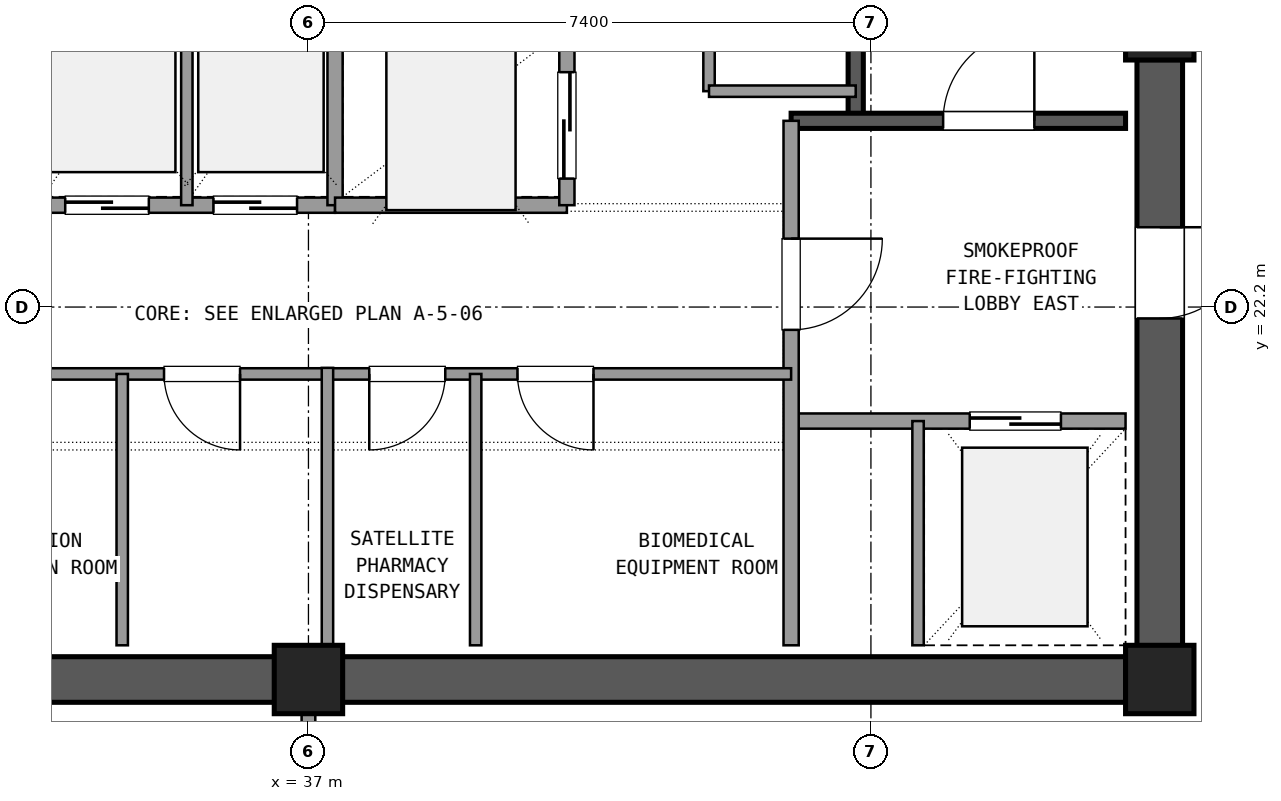
"""IFC4 building model, lengths in metres.
Left out: names, types, materials, properties, quantities, classifications, styles, units other than length and angle.
Written with IfcOpenShell. Run it as: python <this file> out.ifc"""

import sys

from ifc_helpers import new_model, si_unit, direction, frame, frame_2d, origin, origin_2d, place, context, subcontext, project, spatial, rectangle, extrude, element, fill, save


model = new_model("IFC4")
c1 = context("Model", 3, precision=1e-05, world=origin(), true_north=direction((0.0, 1.0)))
c2 = subcontext(c1, "Body", "Model", "MODEL_VIEW")
j1 = project(units=[si_unit("LENGTHUNIT", "METRE"), si_unit("PLANEANGLEUNIT", "RADIAN")], contexts=[c1])
p1 = place(None, origin())
s1 = spatial("IfcSite", under=j1, at=p1, CompositionType="ELEMENT")
p2 = place(p1, origin())
s2 = spatial("IfcBuilding", under=s1, at=p2, CompositionType="ELEMENT")
p3 = place(p2, frame((0.0, 0.0, 242.82)))
s3 = spatial("IfcBuildingStorey", under=s2, at=p3, CompositionType="ELEMENT", Elevation=242.82)
for number, where, z_axis, x_axis in (
    (1, (37.0, 17.3, 0.0), (0.0, 0.0, 1.0), (1.0, 0.0, 0.0)),
    (2, (48.2, 17.3, 0.0), (0.0, 0.0, 1.0), (1.0, 0.0, 0.0)),
    (3, (48.2, 25.9, 0.0), (0.0, 0.0, 1.0), (1.0, 0.0, 0.0)),
):
    element("IfcColumn", number, at=place(p3, frame(where, z_axis=z_axis, x_axis=x_axis)), inside=s3, PredefinedType="COLUMN", context=c2, shape_type="SweptSolid", body=[
        extrude(rectangle(XDim=0.9, YDim=0.9, at=origin_2d()), origin(), (0.0, 0.0, 1.0), 3.6),
    ])
for number, where, z_axis, x_axis in (
    (4, (26.245, 17.3, 0.0), (0.0, 0.0, 1.0), (1.0, 0.0, 0.0)),
    (5, (37.445, 17.3, 0.0), (0.0, 0.0, 1.0), (1.0, 0.0, 0.0)),
):
    element("IfcWall", number, at=place(p3, frame(where, z_axis=z_axis, x_axis=x_axis)), inside=s3, PredefinedType="SHEAR", context=c2, shape_type="SweptSolid", body=[
        extrude(rectangle(XDim=10.31, YDim=0.6, at=frame_2d((5.155, 0.0))), origin(), (0.0, 0.0, 1.0), 3.32),
    ])
p4 = place(p3, frame((48.2, 17.745, 0.0), z_axis=(0.0, 0.0, 1.0), x_axis=(0.0, 1.0, 0.0)))
e6 = element("IfcWall", 6, at=p4, inside=s3, PredefinedType="SHEAR", context=c2, shape_type="SweptSolid", body=[
    extrude(rectangle(XDim=7.71, YDim=0.6, at=frame_2d((3.855, 0.0))), origin(), (0.0, 0.0, 1.0), 3.32),
])
p5 = place(p4, frame((4.305, 0.0, 0.0)))
e7 = element("IfcOpeningElement", 7, at=p5, cuts=e6, PredefinedType="OPENING", context=c2, shape_type="SweptSolid", body=[
    extrude(rectangle(XDim=1.2, YDim=2.15, at=frame_2d((0.6, 1.075))), frame((0.0, 0.31, 0.0), z_axis=(0.0, -1.0, 0.0), x_axis=(1.0, 0.0, 0.0)), (0.0, 0.0, 1.0), 0.62),
])
p6 = place(p3, frame((44.2, 24.65, 0.0), z_axis=(0.0, 0.0, 1.0), x_axis=(0.0, 1.0, 0.0)))
e8 = element("IfcWall", 8, at=p6, inside=s3, PredefinedType="SHEAR", context=c2, shape_type="SweptSolid", body=[
    extrude(rectangle(XDim=9.4, YDim=0.2, at=frame_2d((4.7, 0.0))), origin(), (0.0, 0.0, 1.0), 3.32),
])
p7 = place(p3, frame((43.35, 24.65, 0.0), z_axis=(0.0, 0.0, 1.0), x_axis=(1.0, 0.0, 0.0)))
e9 = element("IfcWall", 9, at=p7, inside=s3, PredefinedType="SHEAR", context=c2, shape_type="SweptSolid", body=[
    extrude(rectangle(XDim=4.4, YDim=0.2, at=frame_2d((2.2, 0.0))), origin(), (0.0, 0.0, 1.0), 3.32),
])
p8 = place(p7, frame((2.0, 0.0, 0.0)))
e10 = element("IfcOpeningElement", 10, at=p8, cuts=e9, PredefinedType="OPENING", context=c2, shape_type="SweptSolid", body=[
    extrude(rectangle(XDim=1.2, YDim=2.15, at=frame_2d((0.6, 1.075))), frame((0.0, 0.11, 0.0), z_axis=(0.0, -1.0, 0.0), x_axis=(1.0, 0.0, 0.0)), (0.0, 0.0, 1.0), 0.22),
])
p9 = place(p3, frame((43.35, 20.7, 0.0), z_axis=(0.0, 0.0, 1.0), x_axis=(1.0, 0.0, 0.0)))
e11 = element("IfcWall", 11, at=p9, inside=s3, PredefinedType="SOLIDWALL", context=c2, shape_type="SweptSolid", body=[
    extrude(rectangle(XDim=4.4, YDim=0.2, at=frame_2d((2.2, 0.0))), origin(), (0.0, 0.0, 1.0), 2.61),
])
p10 = place(p9, frame((2.35, 0.0, 0.0)))
e12 = element("IfcOpeningElement", 12, at=p10, cuts=e11, PredefinedType="OPENING", context=c2, shape_type="SweptSolid", body=[
    extrude(rectangle(XDim=1.2, YDim=2.15, at=frame_2d((0.6, 1.075))), frame((0.0, 0.11, 0.0), z_axis=(0.0, -1.0, 0.0), x_axis=(1.0, 0.0, 0.0)), (0.0, 0.0, 1.0), 0.22),
])
p11 = place(p3, frame((43.35, 17.75, 0.0), z_axis=(0.0, 0.0, 1.0), x_axis=(0.0, 1.0, 0.0)))
e13 = element("IfcWall", 13, at=p11, inside=s3, PredefinedType="SOLIDWALL", context=c2, shape_type="SweptSolid", body=[
    extrude(rectangle(XDim=6.9, YDim=0.2, at=frame_2d((3.45, 0.0))), origin(), (0.0, 0.0, 1.0), 2.61),
])
p12 = place(p11, frame((4.15, 0.0, 0.0)))
e14 = element("IfcOpeningElement", 14, at=p12, cuts=e13, PredefinedType="OPENING", context=c2, shape_type="SweptSolid", body=[
    extrude(rectangle(XDim=1.2, YDim=2.15, at=frame_2d((0.6, 1.075))), frame((0.0, 0.11, 0.0), z_axis=(0.0, -1.0, 0.0), x_axis=(1.0, 0.0, 0.0)), (0.0, 0.0, 1.0), 0.22),
])
p13 = place(p3, frame((45.02, 17.75, 0.0), z_axis=(0.0, 0.0, 1.0), x_axis=(0.0, 1.0, 0.0)))
e15 = element("IfcWall", 15, at=p13, inside=s3, PredefinedType="PARTITIONING", context=c2, shape_type="SweptSolid", body=[
    extrude(rectangle(XDim=2.95, YDim=0.15, at=frame_2d((1.475, 0.0))), origin(), (0.0, 0.0, 1.0), 2.61),
])
p14 = place(p3, frame((30.25, 21.32, 0.0), z_axis=(0.0, 0.0, 1.0), x_axis=(1.0, 0.0, 0.0)))
e16 = element("IfcWall", 16, at=p14, inside=s3, PredefinedType="PARTITIONING", context=c2, shape_type="SweptSolid", body=[
    extrude(rectangle(XDim=7.0, YDim=0.15, at=frame_2d((3.5, 0.0))), origin(), (0.0, 0.0, 1.0), 2.61),
])
p15 = place(p14, frame((0.7, 0.0, 0.0)))
e17 = element("IfcOpeningElement", 17, at=p15, cuts=e16, PredefinedType="OPENING", context=c2, shape_type="SweptSolid", body=[
    extrude(rectangle(XDim=1.0, YDim=2.15, at=frame_2d((0.5, 1.075))), frame((0.0, 0.085, 0.0), z_axis=(0.0, -1.0, 0.0), x_axis=(1.0, 0.0, 0.0)), (0.0, 0.0, 1.0), 0.17),
])
p16 = place(p14, frame((4.85, 0.0, 0.0)))
e18 = element("IfcOpeningElement", 18, at=p16, cuts=e16, PredefinedType="OPENING", context=c2, shape_type="SweptSolid", body=[
    extrude(rectangle(XDim=1.0, YDim=2.15, at=frame_2d((0.5, 1.075))), frame((0.0, 0.085, 0.0), z_axis=(0.0, -1.0, 0.0), x_axis=(1.0, 0.0, 0.0)), (0.0, 0.0, 1.0), 0.17),
])
p17 = place(p3, frame((34.55, 17.75, 0.0), z_axis=(0.0, 0.0, 1.0), x_axis=(0.0, 1.0, 0.0)))
e19 = element("IfcWall", 19, at=p17, inside=s3, PredefinedType="PARTITIONING", context=c2, shape_type="SweptSolid", body=[
    extrude(rectangle(XDim=3.57, YDim=0.15, at=frame_2d((1.785, 0.0))), origin(), (0.0, 0.0, 1.0), 2.61),
])
p18 = place(p3, frame((37.25, 21.32, 0.0), z_axis=(0.0, 0.0, 1.0), x_axis=(1.0, 0.0, 0.0)))
e20 = element("IfcWall", 20, at=p18, inside=s3, PredefinedType="PARTITIONING", context=c2, shape_type="SweptSolid", body=[
    extrude(rectangle(XDim=6.1, YDim=0.15, at=frame_2d((3.05, 0.0))), origin(), (0.0, 0.0, 1.0), 2.61),
])
p19 = place(p18, frame((0.55, 0.0, 0.0)))
e21 = element("IfcOpeningElement", 21, at=p19, cuts=e20, PredefinedType="OPENING", context=c2, shape_type="SweptSolid", body=[
    extrude(rectangle(XDim=1.0, YDim=2.15, at=frame_2d((0.5, 1.075))), frame((0.0, 0.085, 0.0), z_axis=(0.0, -1.0, 0.0), x_axis=(1.0, 0.0, 0.0)), (0.0, 0.0, 1.0), 0.17),
])
p20 = place(p18, frame((2.5, 0.0, 0.0)))
e22 = element("IfcOpeningElement", 22, at=p20, cuts=e20, PredefinedType="OPENING", context=c2, shape_type="SweptSolid", body=[
    extrude(rectangle(XDim=1.0, YDim=2.15, at=frame_2d((0.5, 1.075))), frame((0.0, 0.085, 0.0), z_axis=(0.0, -1.0, 0.0), x_axis=(1.0, 0.0, 0.0)), (0.0, 0.0, 1.0), 0.17),
])
p21 = place(p3, frame((39.2, 17.75, 0.0), z_axis=(0.0, 0.0, 1.0), x_axis=(0.0, 1.0, 0.0)))
e23 = element("IfcWall", 23, at=p21, inside=s3, PredefinedType="PARTITIONING", context=c2, shape_type="SweptSolid", body=[
    extrude(rectangle(XDim=3.57, YDim=0.15, at=frame_2d((1.785, 0.0))), origin(), (0.0, 0.0, 1.0), 2.61),
])
p22 = place(p3, frame((37.25, 17.75, 0.0), z_axis=(0.0, 0.0, 1.0), x_axis=(0.0, 1.0, 0.0)))
e24 = element("IfcWall", 24, at=p22, inside=s3, PredefinedType="PARTITIONING", context=c2, shape_type="SweptSolid", body=[
    extrude(rectangle(XDim=3.65, YDim=0.15, at=frame_2d((1.825, 0.0))), origin(), (0.0, 0.0, 1.0), 2.61),
])
p23 = place(p3, frame((31.45, 23.54, 0.0), z_axis=(0.0, 0.0, 1.0), x_axis=(1.0, 0.0, 0.0)))
e25 = element("IfcWall", 25, at=p23, inside=s3, PredefinedType="SOLIDWALL", context=c2, shape_type="SweptSolid", body=[
    extrude(rectangle(XDim=5.9, YDim=0.2, at=frame_2d((2.95, 0.0))), origin(), (0.0, 0.0, 1.0), 2.61),
])
p24 = place(p23, frame((0.4, 0.0, 0.0)))
e26 = element("IfcOpeningElement", 26, at=p24, cuts=e25, PredefinedType="OPENING", context=c2, shape_type="SweptSolid", body=[
    extrude(rectangle(XDim=1.1, YDim=2.15, at=frame_2d((0.55, 1.075))), frame((0.0, 0.11, 0.0), z_axis=(0.0, -1.0, 0.0), x_axis=(1.0, 0.0, 0.0)), (0.0, 0.0, 1.0), 0.22),
])
p25 = place(p23, frame((2.35, 0.0, 0.0)))
e27 = element("IfcOpeningElement", 27, at=p25, cuts=e25, PredefinedType="OPENING", context=c2, shape_type="SweptSolid", body=[
    extrude(rectangle(XDim=1.1, YDim=2.15, at=frame_2d((0.55, 1.075))), frame((0.0, 0.11, 0.0), z_axis=(0.0, -1.0, 0.0), x_axis=(1.0, 0.0, 0.0)), (0.0, 0.0, 1.0), 0.22),
])
p26 = place(p23, frame((4.3, 0.0, 0.0)))
e28 = element("IfcOpeningElement", 28, at=p26, cuts=e25, PredefinedType="OPENING", context=c2, shape_type="SweptSolid", body=[
    extrude(rectangle(XDim=1.1, YDim=2.15, at=frame_2d((0.55, 1.075))), frame((0.0, 0.11, 0.0), z_axis=(0.0, -1.0, 0.0), x_axis=(1.0, 0.0, 0.0)), (0.0, 0.0, 1.0), 0.22),
])
p27 = place(p3, frame((35.4, 23.54, 0.0), z_axis=(0.0, 0.0, 1.0), x_axis=(0.0, 1.0, 0.0)))
e29 = element("IfcWall", 29, at=p27, inside=s3, PredefinedType="PARTITIONING", context=c2, shape_type="SweptSolid", body=[
    extrude(rectangle(XDim=2.81, YDim=0.15, at=frame_2d((1.405, 0.0))), origin(), (0.0, 0.0, 1.0), 2.61),
])
p28 = place(p3, frame((37.35, 23.54, 0.0), z_axis=(0.0, 0.0, 1.0), x_axis=(0.0, 1.0, 0.0)))
e30 = element("IfcWall", 30, at=p28, inside=s3, PredefinedType="SOLIDWALL", context=c2, shape_type="SweptSolid", body=[
    extrude(rectangle(XDim=6.82, YDim=0.2, at=frame_2d((3.41, 0.0))), origin(), (0.0, 0.0, 1.0), 2.61),
])
p29 = place(p3, frame((37.35, 23.54, 0.0), z_axis=(0.0, 0.0, 1.0), x_axis=(1.0, 0.0, 0.0)))
e31 = element("IfcWall", 31, at=p29, inside=s3, PredefinedType="SOLIDWALL", context=c2, shape_type="SweptSolid", body=[
    extrude(rectangle(XDim=3.05, YDim=0.2, at=frame_2d((1.525, 0.0))), origin(), (0.0, 0.0, 1.0), 2.61),
])
p30 = place(p3, frame((40.4, 23.54, 0.0), z_axis=(0.0, 0.0, 1.0), x_axis=(0.0, 1.0, 0.0)))
e32 = element("IfcWall", 32, at=p30, inside=s3, PredefinedType="SOLIDWALL", context=c2, shape_type="SweptSolid", body=[
    extrude(rectangle(XDim=6.82, YDim=0.2, at=frame_2d((3.41, 0.0))), origin(), (0.0, 0.0, 1.0), 2.61),
])
p31 = place(p30, frame((0.35, 0.0, 0.0)))
e33 = element("IfcOpeningElement", 33, at=p31, cuts=e32, PredefinedType="OPENING", context=c2, shape_type="SweptSolid", body=[
    extrude(rectangle(XDim=1.4, YDim=2.2, at=frame_2d((0.7, 1.1))), frame((0.0, 0.11, 0.0), z_axis=(0.0, -1.0, 0.0), x_axis=(1.0, 0.0, 0.0)), (0.0, 0.0, 1.0), 0.22),
])
p32 = place(p30, frame((2.65, 0.0, 0.0)))
e34 = element("IfcOpeningElement", 34, at=p32, cuts=e32, PredefinedType="OPENING", context=c2, shape_type="SweptSolid", body=[
    extrude(rectangle(XDim=1.4, YDim=2.2, at=frame_2d((0.7, 1.1))), frame((0.0, 0.11, 0.0), z_axis=(0.0, -1.0, 0.0), x_axis=(1.0, 0.0, 0.0)), (0.0, 0.0, 1.0), 0.22),
])
p33 = place(p30, frame((4.85, 0.0, 0.0)))
e35 = element("IfcOpeningElement", 35, at=p33, cuts=e32, PredefinedType="OPENING", context=c2, shape_type="SweptSolid", body=[
    extrude(rectangle(XDim=1.4, YDim=2.2, at=frame_2d((0.7, 1.1))), frame((0.0, 0.11, 0.0), z_axis=(0.0, -1.0, 0.0), x_axis=(1.0, 0.0, 0.0)), (0.0, 0.0, 1.0), 0.22),
])
p34 = place(p3, frame((42.27, 25.04, 0.0), z_axis=(0.0, 0.0, 1.0), x_axis=(0.0, 1.0, 0.0)))
e36 = element("IfcWall", 36, at=p34, inside=s3, PredefinedType="PARTITIONING", context=c2, shape_type="SweptSolid", body=[
    extrude(rectangle(XDim=4.82, YDim=0.15, at=frame_2d((2.41, 0.0))), origin(), (0.0, 0.0, 1.0), 2.61),
])
p35 = place(p34, frame((0.55, 0.0, 0.0)))
e37 = element("IfcOpeningElement", 37, at=p35, cuts=e36, PredefinedType="OPENING", context=c2, shape_type="SweptSolid", body=[
    extrude(rectangle(XDim=1.0, YDim=2.15, at=frame_2d((0.5, 1.075))), frame((0.0, 0.085, 0.0), z_axis=(0.0, -1.0, 0.0), x_axis=(1.0, 0.0, 0.0)), (0.0, 0.0, 1.0), 0.17),
])
p36 = place(p3, frame((42.27, 25.04, 0.0), z_axis=(0.0, 0.0, 1.0), x_axis=(1.0, 0.0, 0.0)))
e38 = element("IfcWall", 38, at=p36, inside=s3, PredefinedType="PARTITIONING", context=c2, shape_type="SweptSolid", body=[
    extrude(rectangle(XDim=1.93, YDim=0.15, at=frame_2d((0.965, 0.0))), origin(), (0.0, 0.0, 1.0), 2.61),
])
p37 = place(p3, frame((37.0, 14.15, 0.0), z_axis=(0.0, 0.0, 1.0), x_axis=(0.0, 1.0, 0.0)))
e39 = element("IfcWall", 39, at=p37, inside=s3, PredefinedType="PARTITIONING", context=c2, shape_type="SweptSolid", body=[
    extrude(rectangle(XDim=2.7, YDim=0.18, at=frame_2d((1.35, 0.0))), origin(), (0.0, 0.0, 1.0), 2.61),
])
p38 = place(p37, frame((0.35, 0.0, 0.0)))
e40 = element("IfcOpeningElement", 40, at=p38, cuts=e39, PredefinedType="OPENING", context=c2, shape_type="SweptSolid", body=[
    extrude(rectangle(XDim=2.0, YDim=2.2, at=frame_2d((1.0, 1.1))), frame((0.0, 0.1, 0.0), z_axis=(0.0, -1.0, 0.0), x_axis=(1.0, 0.0, 0.0)), (0.0, 0.0, 1.0), 0.2),
])
p39 = place(p8, origin())
e41 = element("IfcDoor", 41, at=p39, inside=s3, OperationType="SINGLE_SWING_RIGHT", PredefinedType="DOOR", context=c2, shape_type="SweptSolid", body=[
    extrude(rectangle(XDim=1.2, YDim=2.15, at=frame_2d((0.6, 1.075))), frame((0.0, 0.025, 0.0), z_axis=(0.0, -1.0, 0.0), x_axis=(1.0, 0.0, 0.0)), (0.0, 0.0, 1.0), 0.05),
])
fill(e10, e41)
p40 = place(p10, origin())
e42 = element("IfcDoor", 42, at=p40, inside=s3, OperationType="SLIDING_TO_RIGHT", PredefinedType="DOOR", context=c2, shape_type="SweptSolid", body=[
    extrude(rectangle(XDim=1.2, YDim=2.15, at=frame_2d((0.6, 1.075))), frame((0.0, 0.025, 0.0), z_axis=(0.0, -1.0, 0.0), x_axis=(1.0, 0.0, 0.0)), (0.0, 0.0, 1.0), 0.05),
])
fill(e12, e42)
p41 = place(p12, frame((1.2, 0.0, 0.0), z_axis=(0.0, 0.0, 1.0), x_axis=(-1.0, 0.0, 0.0)))
e43 = element("IfcDoor", 43, at=p41, inside=s3, OperationType="SINGLE_SWING_RIGHT", PredefinedType="DOOR", context=c2, shape_type="SweptSolid", body=[
    extrude(rectangle(XDim=1.2, YDim=2.15, at=frame_2d((0.6, 1.075))), frame((0.0, 0.025, 0.0), z_axis=(0.0, -1.0, 0.0), x_axis=(1.0, 0.0, 0.0)), (0.0, 0.0, 1.0), 0.05),
])
fill(e14, e43)
p42 = place(p5, frame((1.2, 0.0, 0.0), z_axis=(0.0, 0.0, 1.0), x_axis=(-1.0, 0.0, 0.0)))
e44 = element("IfcDoor", 44, at=p42, inside=s3, OperationType="SINGLE_SWING_RIGHT", PredefinedType="DOOR", context=c2, shape_type="SweptSolid", body=[
    extrude(rectangle(XDim=1.2, YDim=2.15, at=frame_2d((0.6, 1.075))), frame((0.0, 0.025, 0.0), z_axis=(0.0, -1.0, 0.0), x_axis=(1.0, 0.0, 0.0)), (0.0, 0.0, 1.0), 0.05),
])
fill(e7, e44)
p43 = place(p16, frame((1.0, 0.0, 0.0), z_axis=(0.0, 0.0, 1.0), x_axis=(-1.0, 0.0, 0.0)))
e45 = element("IfcDoor", 45, at=p43, inside=s3, OperationType="SINGLE_SWING_RIGHT", PredefinedType="DOOR", context=c2, shape_type="SweptSolid", body=[
    extrude(rectangle(XDim=1.0, YDim=2.15, at=frame_2d((0.5, 1.075))), frame((0.0, 0.025, 0.0), z_axis=(0.0, -1.0, 0.0), x_axis=(1.0, 0.0, 0.0)), (0.0, 0.0, 1.0), 0.05),
])
fill(e18, e45)
p44 = place(p19, frame((1.0, 0.0, 0.0), z_axis=(0.0, 0.0, 1.0), x_axis=(-1.0, 0.0, 0.0)))
e46 = element("IfcDoor", 46, at=p44, inside=s3, OperationType="SINGLE_SWING_LEFT", PredefinedType="DOOR", context=c2, shape_type="SweptSolid", body=[
    extrude(rectangle(XDim=1.0, YDim=2.15, at=frame_2d((0.5, 1.075))), frame((0.0, 0.025, 0.0), z_axis=(0.0, -1.0, 0.0), x_axis=(1.0, 0.0, 0.0)), (0.0, 0.0, 1.0), 0.05),
])
fill(e21, e46)
p45 = place(p20, frame((1.0, 0.0, 0.0), z_axis=(0.0, 0.0, 1.0), x_axis=(-1.0, 0.0, 0.0)))
e47 = element("IfcDoor", 47, at=p45, inside=s3, OperationType="SINGLE_SWING_RIGHT", PredefinedType="DOOR", context=c2, shape_type="SweptSolid", body=[
    extrude(rectangle(XDim=1.0, YDim=2.15, at=frame_2d((0.5, 1.075))), frame((0.0, 0.025, 0.0), z_axis=(0.0, -1.0, 0.0), x_axis=(1.0, 0.0, 0.0)), (0.0, 0.0, 1.0), 0.05),
])
fill(e22, e47)
p46 = place(p25, origin())
e48 = element("IfcDoor", 48, at=p46, inside=s3, OperationType="SLIDING_TO_RIGHT", PredefinedType="DOOR", context=c2, shape_type="SweptSolid", body=[
    extrude(rectangle(XDim=1.1, YDim=2.15, at=frame_2d((0.55, 1.075))), frame((0.0, 0.025, 0.0), z_axis=(0.0, -1.0, 0.0), x_axis=(1.0, 0.0, 0.0)), (0.0, 0.0, 1.0), 0.05),
])
fill(e27, e48)
p47 = place(p26, origin())
e49 = element("IfcDoor", 49, at=p47, inside=s3, OperationType="SLIDING_TO_RIGHT", PredefinedType="DOOR", context=c2, shape_type="SweptSolid", body=[
    extrude(rectangle(XDim=1.1, YDim=2.15, at=frame_2d((0.55, 1.075))), frame((0.0, 0.025, 0.0), z_axis=(0.0, -1.0, 0.0), x_axis=(1.0, 0.0, 0.0)), (0.0, 0.0, 1.0), 0.05),
])
fill(e28, e49)
p48 = place(p31, origin())
e50 = element("IfcDoor", 50, at=p48, inside=s3, OperationType="SLIDING_TO_LEFT", PredefinedType="DOOR", context=c2, shape_type="SweptSolid", body=[
    extrude(rectangle(XDim=1.4, YDim=2.2, at=frame_2d((0.7, 1.1))), frame((0.0, 0.025, 0.0), z_axis=(0.0, -1.0, 0.0), x_axis=(1.0, 0.0, 0.0)), (0.0, 0.0, 1.0), 0.05),
])
fill(e33, e50)
save(model, sys.argv[1])
